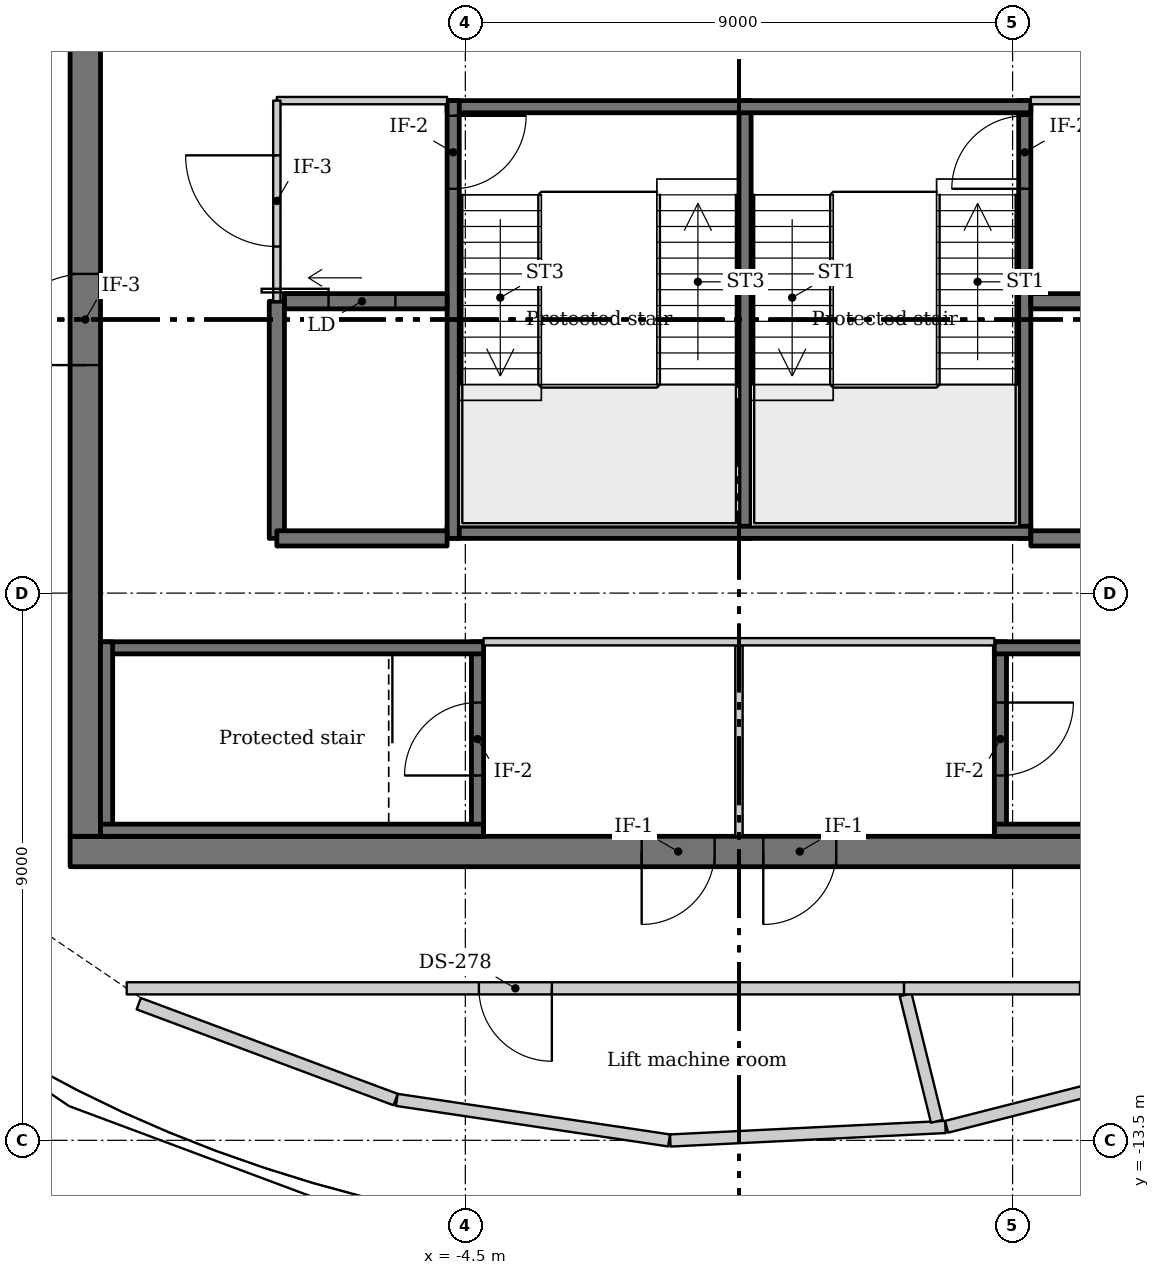
"""IFC4 building model, lengths in metres.
Left out: names, types, materials, properties, quantities, classifications, styles, units other than length and angle.
Written with IfcOpenShell. Run it as: python <this file> out.ifc"""

import sys

from ifc_helpers import new_model, si_unit, direction, frame, frame_2d, origin, place, context, subcontext, project, spatial, rectangle, extrude, source, transform, mapped, element, fill, save


model = new_model("IFC4")
c1 = context("Model", 3, precision=1e-05, world=origin(), true_north=direction((0.0, 1.0)))
c2 = subcontext(c1, "Body", "Model", "MODEL_VIEW")
j1 = project(units=[si_unit("LENGTHUNIT", "METRE"), si_unit("PLANEANGLEUNIT", "RADIAN")], contexts=[c1])
p1 = place(None, origin())
s1 = spatial("IfcSite", under=j1, at=p1, CompositionType="ELEMENT")
p2 = place(p1, origin())
s2 = spatial("IfcBuilding", under=s1, at=p2, CompositionType="ELEMENT")
p3 = place(p2, frame((0.0, 0.0, 352.0)))
s3 = spatial("IfcBuildingStorey", under=s2, at=p3, CompositionType="ELEMENT", Elevation=352.0)
m1 = source(origin(), c2, "Body", "SweptSolid", [
    extrude(rectangle(XDim=22.0, YDim=0.5, at=frame_2d((11.0, 0.0))), origin(), (0.0, 0.0, 1.0), 4.25),
])
p4 = place(p3, frame((-11.0, -8.75, -0.25), z_axis=(0.0, 0.0, 1.0), x_axis=(1.0, 0.0, 0.0)))
e1 = element("IfcWall", 1, at=p4, inside=s3, PredefinedType="SHEAR", context=c2, shape_type="MappedRepresentation", body=[
    mapped(m1, transform((0.0, 0.0, 0.0))),
])
m2 = source(origin(), c2, "Body", "SweptSolid", [
    extrude(rectangle(XDim=1.2, YDim=2.1, at=frame_2d((0.6, 1.05))), frame((0.0, 0.26, 0.0), z_axis=(0.0, -1.0, 0.0), x_axis=(1.0, 0.0, 0.0)), (0.0, 0.0, 1.0), 0.52),
])
p5 = place(p4, frame((9.4, 0.0, 0.25)))
e2 = element("IfcOpeningElement", 2, at=p5, cuts=e1, PredefinedType="OPENING", context=c2, shape_type="MappedRepresentation", body=[
    mapped(m2, transform((0.0, 0.0, 0.0))),
])
p6 = place(p4, frame((11.4, 0.0, 0.25)))
e3 = element("IfcOpeningElement", 3, at=p6, cuts=e1, PredefinedType="OPENING", context=c2, shape_type="MappedRepresentation", body=[
    mapped(m2, transform((0.0, 0.0, 0.0))),
])
m3 = source(origin(), c2, "Body", "SweptSolid", [
    extrude(rectangle(XDim=17.0, YDim=0.5, at=frame_2d((8.5, 0.0))), origin(), (0.0, 0.0, 1.0), 4.25),
])
p7 = place(p3, frame((-10.75, -8.5, -0.25), z_axis=(0.0, 0.0, 1.0), x_axis=(0.0, 1.0, 0.0)))
e4 = element("IfcWall", 4, at=p7, inside=s3, PredefinedType="SHEAR", context=c2, shape_type="MappedRepresentation", body=[
    mapped(m3, transform((0.0, 0.0, 0.0))),
])
m4 = source(origin(), c2, "Body", "SweptSolid", [
    extrude(rectangle(XDim=1.5, YDim=2.1, at=frame_2d((0.75, 1.05))), frame((0.0, 0.26, 0.0), z_axis=(0.0, -1.0, 0.0), x_axis=(1.0, 0.0, 0.0)), (0.0, 0.0, 1.0), 0.52),
])
p8 = place(p7, frame((7.75, 0.0, 0.25)))
e5 = element("IfcOpeningElement", 5, at=p8, cuts=e4, PredefinedType="OPENING", context=c2, shape_type="MappedRepresentation", body=[
    mapped(m4, transform((0.0, 0.0, 0.0))),
])
m5 = source(origin(), c2, "Body", "SweptSolid", [
    extrude(rectangle(XDim=4.51, YDim=0.2, at=frame_2d((2.255, 0.0))), origin(), (0.0, 0.0, 1.0), 4.0),
])
p9 = place(p3, frame((-5.646, -12.83, 0.0), z_axis=(0.0, 0.0, 1.0), x_axis=(-0.936857596237, 0.349711087004, 0.0)))
e6 = element("IfcWall", 6, at=p9, inside=s3, PredefinedType="SOLIDWALL", context=c2, shape_type="MappedRepresentation", body=[
    mapped(m5, transform((0.0, 0.0, 0.0))),
])
m6 = source(origin(), c2, "Body", "SweptSolid", [
    extrude(rectangle(XDim=4.527, YDim=0.2, at=frame_2d((2.263, 0.0))), origin(), (0.0, 0.0, 1.0), 4.0),
])
p10 = place(p3, frame((-1.149, -13.502, 0.0), z_axis=(0.0, 0.0, 1.0), x_axis=(-0.98908499412, 0.147346104146, 0.0)))
e7 = element("IfcWall", 7, at=p10, inside=s3, PredefinedType="SOLIDWALL", context=c2, shape_type="MappedRepresentation", body=[
    mapped(m6, transform((0.0, 0.0, 0.0))),
])
m7 = source(origin(), c2, "Body", "SweptSolid", [
    extrude(rectangle(XDim=4.53, YDim=0.2, at=frame_2d((2.265, 0.0))), origin(), (0.0, 0.0, 1.0), 4.0),
])
p11 = place(p3, frame((3.396, -13.281, 0.0), z_axis=(0.0, 0.0, 1.0), x_axis=(-0.998794180323, -0.049093638625, 0.0)))
e8 = element("IfcWall", 8, at=p11, inside=s3, PredefinedType="SOLIDWALL", context=c2, shape_type="MappedRepresentation", body=[
    mapped(m7, transform((0.0, 0.0, 0.0))),
])
m8 = source(origin(), c2, "Body", "SweptSolid", [
    extrude(rectangle(XDim=4.52, YDim=0.2, at=frame_2d((2.26, 0.0))), origin(), (0.0, 0.0, 1.0), 4.0),
])
p12 = place(p3, frame((7.795, -12.16, 0.0), z_axis=(0.0, 0.0, 1.0), x_axis=(-0.968962042594, -0.247209546764, 0.0)))
e9 = element("IfcWall", 9, at=p12, inside=s3, PredefinedType="SOLIDWALL", context=c2, shape_type="MappedRepresentation", body=[
    mapped(m8, transform((0.0, 0.0, 0.0))),
])
m9 = source(origin(), c2, "Body", "SweptSolid", [
    extrude(rectangle(XDim=7.2, YDim=0.2, at=frame_2d((3.6, 0.0))), origin(), (0.0, 0.0, 1.0), 4.0),
])
p13 = place(p3, frame((0.1, 3.6, 0.0), z_axis=(0.0, 0.0, 1.0), x_axis=(0.0, -1.0, 0.0)))
e10 = element("IfcWall", 10, at=p13, inside=s3, PredefinedType="SHEAR", context=c2, shape_type="MappedRepresentation", body=[
    mapped(m9, transform((0.0, 0.0, 0.0))),
])
p14 = place(p3, frame((4.7, -3.6, 0.0), z_axis=(0.0, 0.0, 1.0), x_axis=(0.0, 1.0, 0.0)))
e11 = element("IfcWall", 11, at=p14, inside=s3, PredefinedType="SHEAR", context=c2, shape_type="MappedRepresentation", body=[
    mapped(m9, transform((0.0, 0.0, 0.0))),
])
m10 = source(origin(), c2, "Body", "SweptSolid", [
    extrude(rectangle(XDim=1.2, YDim=2.1, at=frame_2d((0.6, 1.05))), frame((0.0, 0.11, 0.0), z_axis=(0.0, -1.0, 0.0), x_axis=(1.0, 0.0, 0.0)), (0.0, 0.0, 1.0), 0.22),
])
p15 = place(p14, frame((5.75, 0.0, 0.0)))
e12 = element("IfcOpeningElement", 12, at=p15, cuts=e11, PredefinedType="OPENING", context=c2, shape_type="MappedRepresentation", body=[
    mapped(m10, transform((0.0, 0.0, 0.0))),
])
m11 = source(origin(), c2, "Body", "SweptSolid", [
    extrude(rectangle(XDim=9.6, YDim=0.2, at=frame_2d((4.8, 0.0))), origin(), (0.0, 0.0, 1.0), 4.0),
])
for number, where, z_axis, x_axis in (
    (13, (-4.8, -3.5, 0.0), (0.0, 0.0, 1.0), (1.0, 0.0, 0.0)),
    (14, (4.8, 3.5, 0.0), (0.0, 0.0, 1.0), (-1.0, 0.0, 0.0)),
):
    element("IfcWall", number, at=place(p3, frame(where, z_axis=z_axis, x_axis=x_axis)), inside=s3, PredefinedType="SHEAR", context=c2, shape_type="MappedRepresentation", body=[
        mapped(m11, transform((0.0, 0.0, 0.0))),
    ])
p16 = place(p3, frame((-4.7, 3.6, 0.0), z_axis=(0.0, 0.0, 1.0), x_axis=(0.0, -1.0, 0.0)))
e15 = element("IfcWall", 15, at=p16, inside=s3, PredefinedType="SHEAR", context=c2, shape_type="MappedRepresentation", body=[
    mapped(m9, transform((0.0, 0.0, 0.0))),
])
p17 = place(p16, frame((0.25, 0.0, 0.0)))
e16 = element("IfcOpeningElement", 16, at=p17, cuts=e15, PredefinedType="OPENING", context=c2, shape_type="MappedRepresentation", body=[
    mapped(m10, transform((0.0, 0.0, 0.0))),
])
m12 = source(origin(), c2, "Body", "SweptSolid", [
    extrude(rectangle(XDim=2.675, YDim=0.25, at=frame_2d((1.337, 0.0))), origin(), (0.0, 0.0, 1.0), 4.0),
])
p18 = place(p3, frame((7.475, 0.3, 0.0), z_axis=(0.0, 0.0, 1.0), x_axis=(-1.0, 0.0, 0.0)))
e17 = element("IfcWall", 17, at=p18, inside=s3, PredefinedType="SHEAR", context=c2, shape_type="MappedRepresentation", body=[
    mapped(m12, transform((0.0, 0.0, 0.0))),
])
m13 = source(origin(), c2, "Body", "SweptSolid", [
    extrude(rectangle(XDim=1.1, YDim=2.1, at=frame_2d((0.55, 1.05))), frame((0.0, 0.135, 0.0), z_axis=(0.0, -1.0, 0.0), x_axis=(1.0, 0.0, 0.0)), (0.0, 0.0, 1.0), 0.27),
])
p19 = place(p18, frame((0.725, 0.0, 0.0)))
e18 = element("IfcOpeningElement", 18, at=p19, cuts=e17, PredefinedType="OPENING", context=c2, shape_type="MappedRepresentation", body=[
    mapped(m13, transform((0.0, 0.0, 0.0))),
])
m14 = source(origin(), c2, "Body", "SweptSolid", [
    extrude(rectangle(XDim=2.8, YDim=0.25, at=frame_2d((1.4, 0.0))), origin(), (0.0, 0.0, 1.0), 4.0),
])
p20 = place(p3, frame((4.8, -3.6, 0.0), z_axis=(0.0, 0.0, 1.0), x_axis=(1.0, 0.0, 0.0)))
e19 = element("IfcWall", 19, at=p20, inside=s3, PredefinedType="SHEAR", context=c2, shape_type="MappedRepresentation", body=[
    mapped(m14, transform((0.0, 0.0, 0.0))),
])
m15 = source(origin(), c2, "Body", "SweptSolid", [
    extrude(rectangle(XDim=2.8, YDim=0.12, at=frame_2d((1.4, 0.0))), origin(), (0.0, 0.0, 1.0), 3.5),
])
p21 = place(p3, frame((7.6, 3.6, 0.0), z_axis=(0.0, 0.0, 1.0), x_axis=(-1.0, 0.0, 0.0)))
e20 = element("IfcWall", 20, at=p21, inside=s3, PredefinedType="PARTITIONING", context=c2, shape_type="MappedRepresentation", body=[
    mapped(m15, transform((0.0, 0.0, 0.0))),
])
p22 = place(p3, frame((-4.8, 0.3, 0.0), z_axis=(0.0, 0.0, 1.0), x_axis=(-1.0, 0.0, 0.0)))
e21 = element("IfcWall", 21, at=p22, inside=s3, PredefinedType="SHEAR", context=c2, shape_type="MappedRepresentation", body=[
    mapped(m12, transform((0.0, 0.0, 0.0))),
])
p23 = place(p22, frame((0.85, 0.0, 0.0)))
e22 = element("IfcOpeningElement", 22, at=p23, cuts=e21, PredefinedType="OPENING", context=c2, shape_type="MappedRepresentation", body=[
    mapped(m13, transform((0.0, 0.0, 0.0))),
])
m16 = source(origin(), c2, "Body", "SweptSolid", [
    extrude(rectangle(XDim=3.9, YDim=0.25, at=frame_2d((1.95, 0.0))), origin(), (0.0, 0.0, 1.0), 4.0),
])
p24 = place(p3, frame((-7.6, 0.3, 0.0), z_axis=(0.0, 0.0, 1.0), x_axis=(0.0, -1.0, 0.0)))
e23 = element("IfcWall", 23, at=p24, inside=s3, PredefinedType="SHEAR", context=c2, shape_type="MappedRepresentation", body=[
    mapped(m16, transform((0.0, 0.0, 0.0))),
])
p25 = place(p3, frame((-7.6, -3.6, 0.0), z_axis=(0.0, 0.0, 1.0), x_axis=(1.0, 0.0, 0.0)))
e24 = element("IfcWall", 24, at=p25, inside=s3, PredefinedType="SHEAR", context=c2, shape_type="MappedRepresentation", body=[
    mapped(m14, transform((0.0, 0.0, 0.0))),
])
p26 = place(p3, frame((-4.8, 3.6, 0.0), z_axis=(0.0, 0.0, 1.0), x_axis=(-1.0, 0.0, 0.0)))
e25 = element("IfcWall", 25, at=p26, inside=s3, PredefinedType="PARTITIONING", context=c2, shape_type="MappedRepresentation", body=[
    mapped(m15, transform((0.0, 0.0, 0.0))),
])
m17 = source(origin(), c2, "Body", "SweptSolid", [
    extrude(rectangle(XDim=3.3, YDim=0.12, at=frame_2d((1.65, 0.0))), origin(), (0.0, 0.0, 1.0), 3.5),
])
p27 = place(p3, frame((-7.6, 3.6, 0.0), z_axis=(0.0, 0.0, 1.0), x_axis=(0.0, -1.0, 0.0)))
e26 = element("IfcWall", 26, at=p27, inside=s3, PredefinedType="PARTITIONING", context=c2, shape_type="MappedRepresentation", body=[
    mapped(m17, transform((0.0, 0.0, 0.0))),
])
m18 = source(origin(), c2, "Body", "SweptSolid", [
    extrude(rectangle(XDim=1.5, YDim=2.1, at=frame_2d((0.75, 1.05))), frame((0.0, 0.07, 0.0), z_axis=(0.0, -1.0, 0.0), x_axis=(1.0, 0.0, 0.0)), (0.0, 0.0, 1.0), 0.14),
])
p28 = place(p27, frame((0.9, 0.0, 0.0)))
e27 = element("IfcOpeningElement", 27, at=p28, cuts=e26, PredefinedType="OPENING", context=c2, shape_type="MappedRepresentation", body=[
    mapped(m18, transform((0.0, 0.0, 0.0))),
])
m19 = source(origin(), c2, "Body", "SweptSolid", [
    extrude(rectangle(XDim=3.2, YDim=0.2, at=frame_2d((1.6, 0.0))), origin(), (0.0, 0.0, 1.0), 4.0),
])
p29 = place(p3, frame((-4.3, -8.5, 0.0), z_axis=(0.0, 0.0, 1.0), x_axis=(0.0, 1.0, 0.0)))
e28 = element("IfcWall", 28, at=p29, inside=s3, PredefinedType="SHEAR", context=c2, shape_type="MappedRepresentation", body=[
    mapped(m19, transform((0.0, 0.0, 0.0))),
])
p30 = place(p29, frame((1.0, 0.0, 0.0)))
e29 = element("IfcOpeningElement", 29, at=p30, cuts=e28, PredefinedType="OPENING", context=c2, shape_type="MappedRepresentation", body=[
    mapped(m10, transform((0.0, 0.0, 0.0))),
])
m20 = source(origin(), c2, "Body", "SweptSolid", [
    extrude(rectangle(XDim=6.3, YDim=0.2, at=frame_2d((3.15, 0.0))), origin(), (0.0, 0.0, 1.0), 4.0),
])
p31 = place(p3, frame((-4.2, -5.4, 0.0), z_axis=(0.0, 0.0, 1.0), x_axis=(-1.0, 0.0, 0.0)))
e30 = element("IfcWall", 30, at=p31, inside=s3, PredefinedType="SHEAR", context=c2, shape_type="MappedRepresentation", body=[
    mapped(m20, transform((0.0, 0.0, 0.0))),
])
m21 = source(origin(), c2, "Body", "SweptSolid", [
    extrude(rectangle(XDim=3.14, YDim=0.12, at=frame_2d((1.57, 0.0))), origin(), (0.0, 0.0, 1.0), 3.5),
])
p32 = place(p3, frame((0.0, -8.5, 0.0), z_axis=(0.0, 0.0, 1.0), x_axis=(0.0, 1.0, 0.0)))
e31 = element("IfcWall", 31, at=p32, inside=s3, PredefinedType="PARTITIONING", context=c2, shape_type="MappedRepresentation", body=[
    mapped(m21, transform((0.0, 0.0, 0.0))),
])
m22 = source(origin(), c2, "Body", "SweptSolid", [
    extrude(rectangle(XDim=8.4, YDim=0.12, at=frame_2d((4.2, 0.0))), origin(), (0.0, 0.0, 1.0), 3.5),
])
p33 = place(p3, frame((4.2, -5.3, 0.0), z_axis=(0.0, 0.0, 1.0), x_axis=(-1.0, 0.0, 0.0)))
e32 = element("IfcWall", 32, at=p33, inside=s3, PredefinedType="PARTITIONING", context=c2, shape_type="MappedRepresentation", body=[
    mapped(m22, transform((0.0, 0.0, 0.0))),
])
p34 = place(p3, frame((4.3, -5.3, 0.0), z_axis=(0.0, 0.0, 1.0), x_axis=(0.0, -1.0, 0.0)))
e33 = element("IfcWall", 33, at=p34, inside=s3, PredefinedType="SHEAR", context=c2, shape_type="MappedRepresentation", body=[
    mapped(m19, transform((0.0, 0.0, 0.0))),
])
p35 = place(p34, frame((1.0, 0.0, 0.0)))
e34 = element("IfcOpeningElement", 34, at=p35, cuts=e33, PredefinedType="OPENING", context=c2, shape_type="MappedRepresentation", body=[
    mapped(m10, transform((0.0, 0.0, 0.0))),
])
p36 = place(p3, frame((10.5, -5.4, 0.0), z_axis=(0.0, 0.0, 1.0), x_axis=(-1.0, 0.0, 0.0)))
e35 = element("IfcWall", 35, at=p36, inside=s3, PredefinedType="SHEAR", context=c2, shape_type="MappedRepresentation", body=[
    mapped(m20, transform((0.0, 0.0, 0.0))),
])
m23 = source(origin(), c2, "Body", "SweptSolid", [
    extrude(rectangle(XDim=3.198, YDim=0.2, at=frame_2d((1.599, 0.0))), origin(), (0.0, 0.0, 1.0), 4.0),
])
p37 = place(p3, frame((-10.4, -5.302, 0.0), z_axis=(0.0, 0.0, 1.0), x_axis=(0.0, -1.0, 0.0)))
e36 = element("IfcWall", 36, at=p37, inside=s3, PredefinedType="SHEAR", context=c2, shape_type="MappedRepresentation", body=[
    mapped(m23, transform((0.0, 0.0, 0.0))),
])
m24 = source(origin(), c2, "Body", "SweptSolid", [
    extrude(rectangle(XDim=6.298, YDim=0.2, at=frame_2d((3.149, 0.0))), origin(), (0.0, 0.0, 1.0), 4.0),
])
for number, where, z_axis, x_axis in (
    (37, (-10.5, -8.4, 0.0), (0.0, 0.0, 1.0), (1.0, 0.0, 0.0)),
    (38, (4.202, -8.4, 0.0), (0.0, 0.0, 1.0), (1.0, 0.0, 0.0)),
):
    element("IfcWall", number, at=place(p3, frame(where, z_axis=z_axis, x_axis=x_axis)), inside=s3, PredefinedType="SHEAR", context=c2, shape_type="MappedRepresentation", body=[
        mapped(m24, transform((0.0, 0.0, 0.0))),
    ])
m25 = source(origin(), c2, "Body", "SweptSolid", [
    extrude(rectangle(XDim=12.784, YDim=0.2, at=frame_2d((6.392, 0.0))), origin(), (0.0, 0.0, 1.0), 4.0),
])
p38 = place(p3, frame((2.715, -11.0, 0.0), z_axis=(0.0, 0.0, 1.0), x_axis=(-1.0, 0.0, 0.0)))
e39 = element("IfcWall", 39, at=p38, inside=s3, PredefinedType="PARTITIONING", context=c2, shape_type="MappedRepresentation", body=[
    mapped(m25, transform((0.0, 0.0, 0.0))),
])
p39 = place(p38, frame((5.792, 0.0, 0.0)))
e40 = element("IfcOpeningElement", 40, at=p39, cuts=e39, PredefinedType="OPENING", context=c2, shape_type="MappedRepresentation", body=[
    mapped(m10, transform((0.0, 0.0, 0.0))),
])
m26 = source(origin(), c2, "Body", "SweptSolid", [
    extrude(rectangle(XDim=2.143, YDim=0.2, at=frame_2d((1.071, 0.0))), origin(), (0.0, 0.0, 1.0), 4.0),
])
p40 = place(p3, frame((2.741, -11.107, 0.0), z_axis=(0.0, 0.0, 1.0), x_axis=(0.239853646519, -0.970809058596, 0.0)))
e41 = element("IfcWall", 41, at=p40, inside=s3, PredefinedType="PARTITIONING", context=c2, shape_type="MappedRepresentation", body=[
    mapped(m26, transform((0.0, 0.0, 0.0))),
])
m27 = source(origin(), c2, "Body", "SweptSolid", [
    extrude(rectangle(XDim=6.985, YDim=0.2, at=frame_2d((3.492, 0.0))), origin(), (0.0, 0.0, 1.0), 4.0),
])
p41 = place(p3, frame((9.7, -11.0, 0.0), z_axis=(0.0, 0.0, 1.0), x_axis=(-1.0, 0.0, 0.0)))
e42 = element("IfcWall", 42, at=p41, inside=s3, PredefinedType="PARTITIONING", context=c2, shape_type="MappedRepresentation", body=[
    mapped(m27, transform((0.0, 0.0, 0.0))),
])
p42 = place(p41, frame((2.892, 0.0, 0.0)))
e43 = element("IfcOpeningElement", 43, at=p42, cuts=e42, PredefinedType="OPENING", context=c2, shape_type="MappedRepresentation", body=[
    mapped(m10, transform((0.0, 0.0, 0.0))),
])
m28 = source(origin(), c2, "Body", "SweptSolid", [
    extrude(rectangle(XDim=1.2, YDim=2.1, at=frame_2d((0.6, 1.05))), frame((0.0, 0.025, 0.0), z_axis=(0.0, -1.0, 0.0), x_axis=(1.0, 0.0, 0.0)), (0.0, 0.0, 1.0), 0.05),
])
p43 = place(p15, origin())
e44 = element("IfcDoor", 44, at=p43, inside=s3, OperationType="SINGLE_SWING_RIGHT", PredefinedType="DOOR", context=c2, shape_type="MappedRepresentation", body=[
    mapped(m28, transform((0.0, 0.0, 0.0))),
])
fill(e12, e44)
m29 = source(origin(), c2, "Body", "SweptSolid", [
    extrude(rectangle(XDim=1.1, YDim=2.1, at=frame_2d((0.55, 1.05))), frame((0.0, 0.025, 0.0), z_axis=(0.0, -1.0, 0.0), x_axis=(1.0, 0.0, 0.0)), (0.0, 0.0, 1.0), 0.05),
])
p44 = place(p23, origin())
e45 = element("IfcDoor", 45, at=p44, inside=s3, OperationType="SLIDING_TO_RIGHT", PredefinedType="DOOR", context=c2, shape_type="MappedRepresentation", body=[
    mapped(m29, transform((0.0, 0.0, 0.0))),
])
fill(e22, e45)
p45 = place(p17, origin())
e46 = element("IfcDoor", 46, at=p45, inside=s3, OperationType="SINGLE_SWING_RIGHT", PredefinedType="DOOR", context=c2, shape_type="MappedRepresentation", body=[
    mapped(m28, transform((0.0, 0.0, 0.0))),
])
fill(e16, e46)
p46 = place(p30, origin())
e47 = element("IfcDoor", 47, at=p46, inside=s3, OperationType="SINGLE_SWING_RIGHT", PredefinedType="DOOR", context=c2, shape_type="MappedRepresentation", body=[
    mapped(m28, transform((0.0, 0.0, 0.0))),
])
fill(e29, e47)
p47 = place(p5, origin())
e48 = element("IfcDoor", 48, at=p47, inside=s3, OperationType="SINGLE_SWING_RIGHT", PredefinedType="DOOR", context=c2, shape_type="MappedRepresentation", body=[
    mapped(m28, transform((0.0, 0.0, 0.0))),
])
fill(e2, e48)
p48 = place(p35, origin())
e49 = element("IfcDoor", 49, at=p48, inside=s3, OperationType="SINGLE_SWING_RIGHT", PredefinedType="DOOR", context=c2, shape_type="MappedRepresentation", body=[
    mapped(m28, transform((0.0, 0.0, 0.0))),
])
fill(e34, e49)
p49 = place(p6, origin())
e50 = element("IfcDoor", 50, at=p49, inside=s3, OperationType="SINGLE_SWING_LEFT", PredefinedType="DOOR", context=c2, shape_type="MappedRepresentation", body=[
    mapped(m28, transform((0.0, 0.0, 0.0))),
])
fill(e3, e50)
m30 = source(origin(), c2, "Body", "SweptSolid", [
    extrude(rectangle(XDim=1.5, YDim=2.1, at=frame_2d((0.75, 1.05))), frame((0.0, 0.025, 0.0), z_axis=(0.0, -1.0, 0.0), x_axis=(1.0, 0.0, 0.0)), (0.0, 0.0, 1.0), 0.05),
])
p50 = place(p8, origin())
e51 = element("IfcDoor", 51, at=p50, inside=s3, OperationType="DOUBLE_DOOR_SINGLE_SWING", PredefinedType="DOOR", context=c2, shape_type="MappedRepresentation", body=[
    mapped(m30, transform((0.0, 0.0, 0.0))),
])
fill(e5, e51)
p51 = place(p28, origin())
e52 = element("IfcDoor", 52, at=p51, inside=s3, OperationType="DOUBLE_DOOR_SINGLE_SWING", PredefinedType="DOOR", context=c2, shape_type="MappedRepresentation", body=[
    mapped(m30, transform((0.0, 0.0, 0.0))),
])
fill(e27, e52)
m31 = source(origin(), c2, "Body", "SweptSolid", [
    extrude(rectangle(XDim=1.2, YDim=2.1, at=frame_2d((0.6, 1.05))), frame((0.0, 0.025, 0.0), z_axis=(0.0, -1.0, 0.0), x_axis=(1.0, 0.0, 0.0)), (0.0, 0.0, 1.0), 0.05),
])
p52 = place(p39, origin())
e53 = element("IfcDoor", 53, at=p52, inside=s3, OperationType="SINGLE_SWING_LEFT", PredefinedType="DOOR", context=c2, shape_type="MappedRepresentation", body=[
    mapped(m31, transform((0.0, 0.0, 0.0))),
])
fill(e40, e53)
save(model, sys.argv[1])
